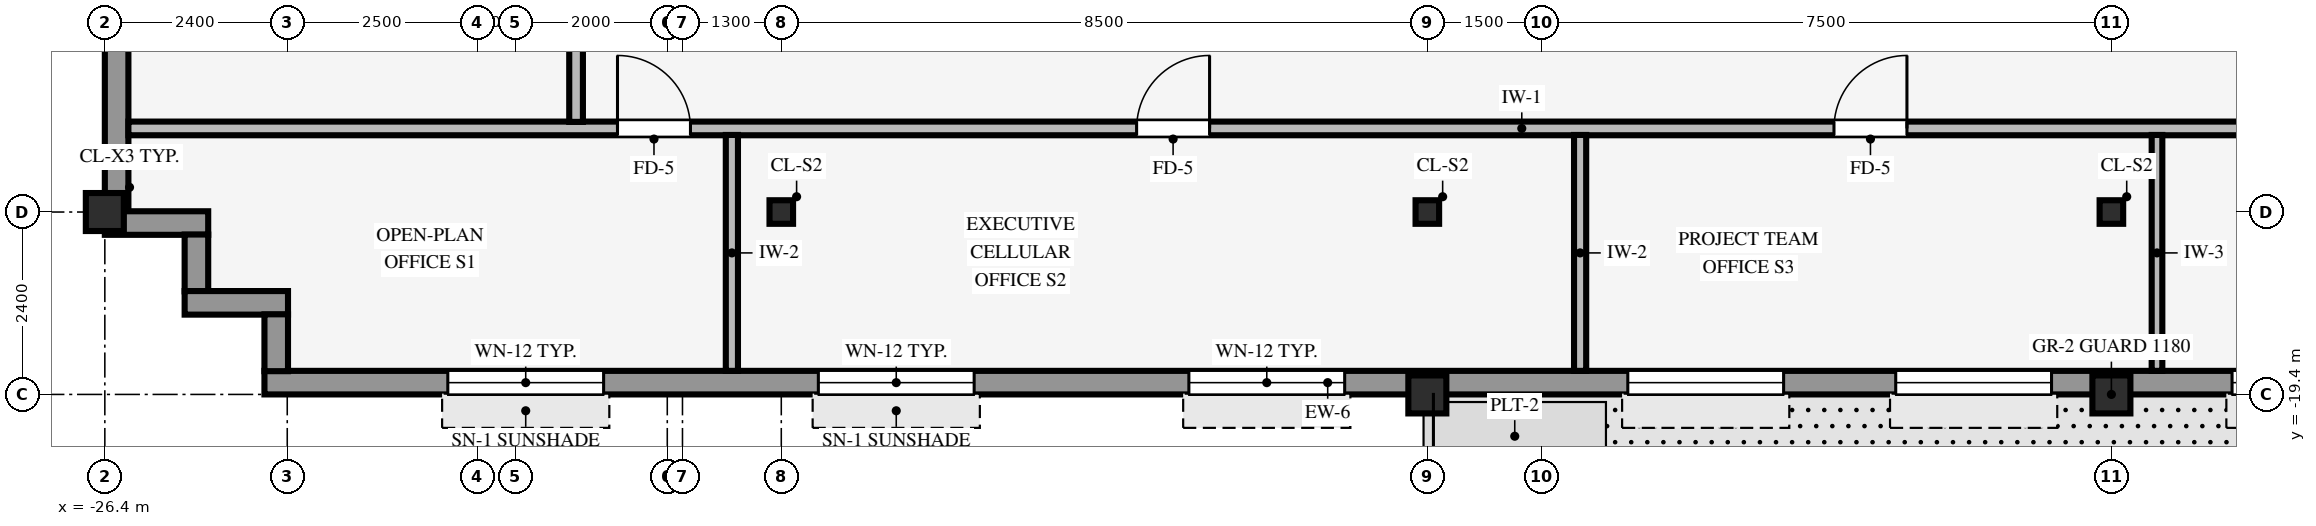
"""IFC4 building model, lengths in metres.
Left out: names, types, materials, properties, quantities, classifications, styles, units other than length and angle.
Written with IfcOpenShell. Run it as: python <this file> out.ifc"""

import sys

from ifc_helpers import new_model, si_unit, direction, frame, frame_2d, origin, origin_2d, place, context, subcontext, project, spatial, rectangle, hollow_rectangle, i_section, extrude, source, transform, mapped, element, fill, save


model = new_model("IFC4")
c1 = context("Model", 3, precision=1e-05, world=origin(), true_north=direction((0.0, 1.0)))
c2 = subcontext(c1, "Body", "Model", "MODEL_VIEW")
j1 = project(units=[si_unit("LENGTHUNIT", "METRE"), si_unit("PLANEANGLEUNIT", "RADIAN")], contexts=[c1])
p1 = place(None, origin())
s1 = spatial("IfcSite", under=j1, at=p1, CompositionType="ELEMENT")
p2 = place(p1, origin())
s2 = spatial("IfcBuilding", under=s1, at=p2, CompositionType="ELEMENT")
p3 = place(p2, frame((0.0, 0.0, 209.15)))
s3 = spatial("IfcBuildingStorey", under=s2, at=p3, CompositionType="ELEMENT", Elevation=209.15)
p4 = place(p3, frame((-26.4, -17.0, 0.0), z_axis=(0.0, 0.0, 1.0), x_axis=(1.0, 0.0, 0.0)))
e1 = element("IfcColumn", 1, at=p4, inside=s3, PredefinedType="COLUMN", context=c2, shape_type="SweptSolid", body=[
    extrude(hollow_rectangle(XDim=0.5, YDim=0.5, WallThickness=0.032, InnerFilletRadius=0.032, OuterFilletRadius=0.064, at=origin_2d()), origin(), (0.0, 0.0, 1.0), 3.37),
])
for number, where, z_axis, x_axis in (
    (2, (-9.0, -19.4, -0.4), (0.0, 0.0, 1.0), (1.0, 0.0, 0.0)),
    (3, (0.0, -19.4, -0.4), (0.0, 0.0, 1.0), (1.0, 0.0, 0.0)),
):
    element("IfcColumn", number, at=place(p3, frame(where, z_axis=z_axis, x_axis=x_axis)), inside=s3, PredefinedType="COLUMN", context=c2, shape_type="SweptSolid", body=[
        extrude(hollow_rectangle(XDim=0.5, YDim=0.5, WallThickness=0.032, InnerFilletRadius=0.032, OuterFilletRadius=0.064, at=origin_2d()), origin(), (0.0, 0.0, 1.0), 3.77),
    ])
for number, where, z_axis, x_axis in (
    (4, (0.0, -17.0, 0.0), (0.0, 0.0, 1.0), (1.0, 0.0, 0.0)),
    (5, (-17.5, -17.0, 0.0), (0.0, 0.0, 1.0), (1.0, 0.0, 0.0)),
    (6, (-9.0, -17.0, 0.0), (0.0, 0.0, 1.0), (1.0, 0.0, 0.0)),
):
    element("IfcColumn", number, at=place(p3, frame(where, z_axis=z_axis, x_axis=x_axis)), inside=s3, PredefinedType="COLUMN", context=c2, shape_type="SweptSolid", body=[
        extrude(i_section(OverallWidth=0.31, OverallDepth=0.31, WebThickness=0.015, FlangeThickness=0.015, FilletRadius=0.015, at=origin_2d()), origin(), (0.0, 0.0, 1.0), 3.37),
    ])
p5 = place(p3, frame((-24.3, -19.245, 0.0), z_axis=(0.0, 0.0, 1.0), x_axis=(1.0, 0.0, 0.0)))
e7 = element("IfcWall", 7, at=p5, inside=s3, PredefinedType="STANDARD", context=c2, shape_type="SweptSolid", body=[
    extrude(rectangle(XDim=41.0, YDim=0.31, at=frame_2d((20.5, 0.0))), origin(), (0.0, 0.0, 1.0), 2.705),
])
p6 = place(p5, frame((29.45, 0.0, 0.0), z_axis=(0.0, 0.0, 1.0), x_axis=(-1.0, 0.0, 0.0)))
e8 = element("IfcOpeningElement", 8, at=p6, cuts=e7, PredefinedType="OPENING", context=c2, shape_type="SweptSolid", body=[
    extrude(rectangle(XDim=1.05, YDim=2.1, at=frame_2d((0.525, 1.05))), frame((0.0, 0.165, 0.0), z_axis=(0.0, -1.0, 0.0), x_axis=(1.0, 0.0, 0.0)), (0.0, 0.0, 1.0), 0.33),
])
p7 = place(p5, frame((2.413, 0.0, 0.8)))
e9 = element("IfcOpeningElement", 9, at=p7, cuts=e7, PredefinedType="OPENING", context=c2, shape_type="SweptSolid", body=[
    extrude(rectangle(XDim=2.05, YDim=1.52, at=frame_2d((1.025, 0.76))), frame((0.0, 0.165, 0.0), z_axis=(0.0, -1.0, 0.0), x_axis=(1.0, 0.0, 0.0)), (0.0, 0.0, 1.0), 0.33),
])
p8 = place(p5, frame((7.288, 0.0, 0.8)))
e10 = element("IfcOpeningElement", 10, at=p8, cuts=e7, PredefinedType="OPENING", context=c2, shape_type="SweptSolid", body=[
    extrude(rectangle(XDim=2.05, YDim=1.52, at=frame_2d((1.025, 0.76))), frame((0.0, 0.165, 0.0), z_axis=(0.0, -1.0, 0.0), x_axis=(1.0, 0.0, 0.0)), (0.0, 0.0, 1.0), 0.33),
])
p9 = place(p5, frame((12.163, 0.0, 0.8)))
e11 = element("IfcOpeningElement", 11, at=p9, cuts=e7, PredefinedType="OPENING", context=c2, shape_type="SweptSolid", body=[
    extrude(rectangle(XDim=2.05, YDim=1.52, at=frame_2d((1.025, 0.76))), frame((0.0, 0.165, 0.0), z_axis=(0.0, -1.0, 0.0), x_axis=(1.0, 0.0, 0.0)), (0.0, 0.0, 1.0), 0.33),
])
p10 = place(p5, frame((17.938, 0.0, 0.8)))
e12 = element("IfcOpeningElement", 12, at=p10, cuts=e7, PredefinedType="OPENING", context=c2, shape_type="SweptSolid", body=[
    extrude(rectangle(XDim=2.05, YDim=1.52, at=frame_2d((1.025, 0.76))), frame((0.0, 0.165, 0.0), z_axis=(0.0, -1.0, 0.0), x_axis=(1.0, 0.0, 0.0)), (0.0, 0.0, 1.0), 0.33),
])
p11 = place(p5, frame((21.462, 0.0, 0.8)))
e13 = element("IfcOpeningElement", 13, at=p11, cuts=e7, PredefinedType="OPENING", context=c2, shape_type="SweptSolid", body=[
    extrude(rectangle(XDim=2.05, YDim=1.52, at=frame_2d((1.025, 0.76))), frame((0.0, 0.165, 0.0), z_axis=(0.0, -1.0, 0.0), x_axis=(1.0, 0.0, 0.0)), (0.0, 0.0, 1.0), 0.33),
])
p12 = place(p5, frame((25.887, 0.0, 0.8)))
e14 = element("IfcOpeningElement", 14, at=p12, cuts=e7, PredefinedType="OPENING", context=c2, shape_type="SweptSolid", body=[
    extrude(rectangle(XDim=2.05, YDim=1.52, at=frame_2d((1.025, 0.76))), frame((0.0, 0.165, 0.0), z_axis=(0.0, -1.0, 0.0), x_axis=(1.0, 0.0, 0.0)), (0.0, 0.0, 1.0), 0.33),
])
p13 = place(p5, frame((30.312, 0.0, 0.8)))
e15 = element("IfcOpeningElement", 15, at=p13, cuts=e7, PredefinedType="OPENING", context=c2, shape_type="SweptSolid", body=[
    extrude(rectangle(XDim=2.05, YDim=1.52, at=frame_2d((1.025, 0.76))), frame((0.0, 0.165, 0.0), z_axis=(0.0, -1.0, 0.0), x_axis=(1.0, 0.0, 0.0)), (0.0, 0.0, 1.0), 0.33),
])
p14 = place(p5, frame((36.538, 0.0, 0.8)))
e16 = element("IfcOpeningElement", 16, at=p14, cuts=e7, PredefinedType="OPENING", context=c2, shape_type="SweptSolid", body=[
    extrude(rectangle(XDim=2.05, YDim=1.52, at=frame_2d((1.025, 0.76))), frame((0.0, 0.165, 0.0), z_axis=(0.0, -1.0, 0.0), x_axis=(1.0, 0.0, 0.0)), (0.0, 0.0, 1.0), 0.33),
])
p15 = place(p3, frame((-26.245, -16.994, 0.0), z_axis=(0.0, 0.0, 1.0), x_axis=(0.0, 1.0, 0.0)))
e17 = element("IfcWall", 17, at=p15, inside=s3, PredefinedType="STANDARD", context=c2, shape_type="SweptSolid", body=[
    extrude(rectangle(XDim=33.988, YDim=0.31, at=frame_2d((16.994, 0.0))), origin(), (0.0, 0.0, 1.0), 2.705),
])
p16 = place(p15, frame((21.194, 0.0, 0.0)))
e18 = element("IfcOpeningElement", 18, at=p16, cuts=e17, PredefinedType="OPENING", context=c2, shape_type="SweptSolid", body=[
    extrude(rectangle(XDim=1.05, YDim=2.1, at=frame_2d((0.525, 1.05))), frame((0.0, 0.165, 0.0), z_axis=(0.0, -1.0, 0.0), x_axis=(1.0, 0.0, 0.0)), (0.0, 0.0, 1.0), 0.33),
])
p17 = place(p15, frame((2.66, 0.0, 0.8)))
e19 = element("IfcOpeningElement", 19, at=p17, cuts=e17, PredefinedType="OPENING", context=c2, shape_type="SweptSolid", body=[
    extrude(rectangle(XDim=1.25, YDim=1.52, at=frame_2d((0.625, 0.76))), frame((0.0, 0.165, 0.0), z_axis=(0.0, -1.0, 0.0), x_axis=(1.0, 0.0, 0.0)), (0.0, 0.0, 1.0), 0.33),
])
p18 = place(p15, frame((8.13, 0.0, 0.8)))
e20 = element("IfcOpeningElement", 20, at=p18, cuts=e17, PredefinedType="OPENING", context=c2, shape_type="SweptSolid", body=[
    extrude(rectangle(XDim=1.25, YDim=1.52, at=frame_2d((0.625, 0.76))), frame((0.0, 0.165, 0.0), z_axis=(0.0, -1.0, 0.0), x_axis=(1.0, 0.0, 0.0)), (0.0, 0.0, 1.0), 0.33),
])
p19 = place(p15, frame((11.799, 0.0, 0.8)))
e21 = element("IfcOpeningElement", 21, at=p19, cuts=e17, PredefinedType="OPENING", context=c2, shape_type="SweptSolid", body=[
    extrude(rectangle(XDim=1.25, YDim=1.52, at=frame_2d((0.625, 0.76))), frame((0.0, 0.165, 0.0), z_axis=(0.0, -1.0, 0.0), x_axis=(1.0, 0.0, 0.0)), (0.0, 0.0, 1.0), 0.33),
])
p20 = place(p15, frame((17.719, 0.0, 0.8)))
e22 = element("IfcOpeningElement", 22, at=p20, cuts=e17, PredefinedType="OPENING", context=c2, shape_type="SweptSolid", body=[
    extrude(rectangle(XDim=1.25, YDim=1.52, at=frame_2d((0.625, 0.76))), frame((0.0, 0.165, 0.0), z_axis=(0.0, -1.0, 0.0), x_axis=(1.0, 0.0, 0.0)), (0.0, 0.0, 1.0), 0.33),
])
p21 = place(p15, frame((19.589, 0.0, 0.8)))
e23 = element("IfcOpeningElement", 23, at=p21, cuts=e17, PredefinedType="OPENING", context=c2, shape_type="SweptSolid", body=[
    extrude(rectangle(XDim=1.25, YDim=1.52, at=frame_2d((0.625, 0.76))), frame((0.0, 0.165, 0.0), z_axis=(0.0, -1.0, 0.0), x_axis=(1.0, 0.0, 0.0)), (0.0, 0.0, 1.0), 0.33),
])
p22 = place(p15, frame((24.608, 0.0, 0.8)))
e24 = element("IfcOpeningElement", 24, at=p22, cuts=e17, PredefinedType="OPENING", context=c2, shape_type="SweptSolid", body=[
    extrude(rectangle(XDim=1.25, YDim=1.52, at=frame_2d((0.625, 0.76))), frame((0.0, 0.165, 0.0), z_axis=(0.0, -1.0, 0.0), x_axis=(1.0, 0.0, 0.0)), (0.0, 0.0, 1.0), 0.33),
])
p23 = place(p15, frame((30.078, 0.0, 0.8)))
e25 = element("IfcOpeningElement", 25, at=p23, cuts=e17, PredefinedType="OPENING", context=c2, shape_type="SweptSolid", body=[
    extrude(rectangle(XDim=1.25, YDim=1.52, at=frame_2d((0.625, 0.76))), frame((0.0, 0.165, 0.0), z_axis=(0.0, -1.0, 0.0), x_axis=(1.0, 0.0, 0.0)), (0.0, 0.0, 1.0), 0.33),
])
p24 = place(p3, frame((-26.4, -17.145, 0.0), z_axis=(0.0, 0.0, 1.0), x_axis=(1.0, 0.0, 0.0)))
e26 = element("IfcWall", 26, at=p24, inside=s3, PredefinedType="STANDARD", context=c2, shape_type="SweptSolid", body=[
    extrude(rectangle(XDim=1.36, YDim=0.31, at=frame_2d((0.68, 0.0))), origin(), (0.0, 0.0, 1.0), 2.816),
])
p25 = place(p3, frame((-25.195, -18.044, 0.0), z_axis=(0.0, 0.0, 1.0), x_axis=(0.0, 1.0, 0.0)))
e27 = element("IfcWall", 27, at=p25, inside=s3, PredefinedType="STANDARD", context=c2, shape_type="SweptSolid", body=[
    extrude(rectangle(XDim=0.748, YDim=0.31, at=frame_2d((0.374, 0.0))), origin(), (0.0, 0.0, 1.0), 2.816),
])
p26 = place(p3, frame((-25.35, -18.195, 0.0), z_axis=(0.0, 0.0, 1.0), x_axis=(1.0, 0.0, 0.0)))
e28 = element("IfcWall", 28, at=p26, inside=s3, PredefinedType="STANDARD", context=c2, shape_type="SweptSolid", body=[
    extrude(rectangle(XDim=1.36, YDim=0.31, at=frame_2d((0.68, 0.0))), origin(), (0.0, 0.0, 1.0), 2.816),
])
p27 = place(p3, frame((-24.145, -19.094, 0.0), z_axis=(0.0, 0.0, 1.0), x_axis=(0.0, 1.0, 0.0)))
e29 = element("IfcWall", 29, at=p27, inside=s3, PredefinedType="STANDARD", context=c2, shape_type="SweptSolid", body=[
    extrude(rectangle(XDim=0.748, YDim=0.31, at=frame_2d((0.374, 0.0))), origin(), (0.0, 0.0, 1.0), 2.816),
])
p28 = place(p3, frame((-26.09, -15.9, 0.0), z_axis=(0.0, 0.0, 1.0), x_axis=(1.0, 0.0, 0.0)))
e30 = element("IfcWall", 30, at=p28, inside=s3, PredefinedType="PARTITIONING", context=c2, shape_type="SweptSolid", body=[
    extrude(rectangle(XDim=35.09, YDim=0.18, at=frame_2d((17.545, 0.0))), origin(), (0.0, 0.0, 1.0), 3.36),
])
p29 = place(p28, frame((13.265, 0.0, 0.0)))
e31 = element("IfcOpeningElement", 31, at=p29, cuts=e30, PredefinedType="OPENING", context=c2, shape_type="SweptSolid", body=[
    extrude(rectangle(XDim=0.96, YDim=2.1, at=frame_2d((0.48, 1.05))), frame((0.0, 0.1, 0.0), z_axis=(0.0, -1.0, 0.0), x_axis=(1.0, 0.0, 0.0)), (0.0, 0.0, 1.0), 0.2),
])
p30 = place(p28, frame((22.44, 0.0, 0.0)))
e32 = element("IfcOpeningElement", 32, at=p30, cuts=e30, PredefinedType="OPENING", context=c2, shape_type="SweptSolid", body=[
    extrude(rectangle(XDim=0.96, YDim=2.1, at=frame_2d((0.48, 1.05))), frame((0.0, 0.1, 0.0), z_axis=(0.0, -1.0, 0.0), x_axis=(1.0, 0.0, 0.0)), (0.0, 0.0, 1.0), 0.2),
])
p31 = place(p28, frame((29.235, 0.0, 0.0)))
e33 = element("IfcOpeningElement", 33, at=p31, cuts=e30, PredefinedType="OPENING", context=c2, shape_type="SweptSolid", body=[
    extrude(rectangle(XDim=0.96, YDim=2.1, at=frame_2d((0.48, 1.05))), frame((0.0, 0.1, 0.0), z_axis=(0.0, -1.0, 0.0), x_axis=(1.0, 0.0, 0.0)), (0.0, 0.0, 1.0), 0.2),
])
p32 = place(p28, frame((6.435, 0.0, 0.0)))
e34 = element("IfcOpeningElement", 34, at=p32, cuts=e30, PredefinedType="OPENING", context=c2, shape_type="SweptSolid", body=[
    extrude(rectangle(XDim=0.96, YDim=2.1, at=frame_2d((0.48, 1.05))), frame((0.0, 0.1, 0.0), z_axis=(0.0, -1.0, 0.0), x_axis=(1.0, 0.0, 0.0)), (0.0, 0.0, 1.0), 0.2),
])
p33 = place(p3, frame((-20.2, -15.814, 0.0), z_axis=(0.0, 0.0, 1.0), x_axis=(0.0, 1.0, 0.0)))
e35 = element("IfcWall", 35, at=p33, inside=s3, PredefinedType="PARTITIONING", context=c2, shape_type="SweptSolid", body=[
    extrude(rectangle(XDim=31.628, YDim=0.18, at=frame_2d((15.814, 0.0))), origin(), (0.0, 0.0, 1.0), 3.36),
])
p34 = place(p33, frame((15.334, 0.0, 0.0)))
e36 = element("IfcOpeningElement", 36, at=p34, cuts=e35, PredefinedType="OPENING", context=c2, shape_type="SweptSolid", body=[
    extrude(rectangle(XDim=0.96, YDim=2.1, at=frame_2d((0.48, 1.05))), frame((0.0, 0.1, 0.0), z_axis=(0.0, -1.0, 0.0), x_axis=(1.0, 0.0, 0.0)), (0.0, 0.0, 1.0), 0.2),
])
for number, where, z_axis, x_axis in (
    (37, (-18.15, -19.09, 0.0), (0.0, 0.0, 1.0), (0.0, 1.0, 0.0)),
    (38, (-6.99, -19.09, 0.0), (0.0, 0.0, 1.0), (0.0, 1.0, 0.0)),
):
    element("IfcWall", number, at=place(p3, frame(where, z_axis=z_axis, x_axis=x_axis)), inside=s3, PredefinedType="PARTITIONING", context=c2, shape_type="SweptSolid", body=[
        extrude(rectangle(XDim=3.104, YDim=0.16, at=frame_2d((1.552, 0.0))), origin(), (0.0, 0.0, 1.0), 3.36),
    ])
p35 = place(p3, frame((0.6, -19.09, 0.0), z_axis=(0.0, 0.0, 1.0), x_axis=(0.0, 1.0, 0.0)))
e39 = element("IfcWall", 39, at=p35, inside=s3, PredefinedType="PARTITIONING", context=c2, shape_type="SweptSolid", body=[
    extrude(rectangle(XDim=3.104, YDim=0.14, at=frame_2d((1.552, 0.0))), origin(), (0.0, 0.0, 1.0), 3.36),
])
m1 = source(origin(), c2, "Body", "SweptSolid", [
    extrude(rectangle(XDim=2.05, YDim=1.52, at=frame_2d((1.025, 0.76))), frame((0.0, 0.03, 0.0), z_axis=(0.0, -1.0, 0.0), x_axis=(1.0, 0.0, 0.0)), (0.0, 0.0, 1.0), 0.06),
])
p36 = place(p7, origin())
e40 = element("IfcWindow", 40, at=p36, inside=s3, PartitioningType="SINGLE_PANEL", PredefinedType="WINDOW", context=c2, shape_type="MappedRepresentation", body=[
    mapped(m1, transform((0.0, 0.0, 0.0), scale=1.0)),
])
fill(e9, e40)
p37 = place(p8, origin())
e41 = element("IfcWindow", 41, at=p37, inside=s3, PartitioningType="SINGLE_PANEL", PredefinedType="WINDOW", context=c2, shape_type="MappedRepresentation", body=[
    mapped(m1, transform((0.0, 0.0, 0.0), scale=1.0)),
])
fill(e10, e41)
p38 = place(p9, origin())
e42 = element("IfcWindow", 42, at=p38, inside=s3, PartitioningType="SINGLE_PANEL", PredefinedType="WINDOW", context=c2, shape_type="MappedRepresentation", body=[
    mapped(m1, transform((0.0, 0.0, 0.0), scale=1.0)),
])
fill(e11, e42)
p39 = place(p10, origin())
e43 = element("IfcWindow", 43, at=p39, inside=s3, PartitioningType="SINGLE_PANEL", PredefinedType="WINDOW", context=c2, shape_type="MappedRepresentation", body=[
    mapped(m1, transform((0.0, 0.0, 0.0), scale=1.0)),
])
fill(e12, e43)
p40 = place(p11, origin())
e44 = element("IfcWindow", 44, at=p40, inside=s3, PartitioningType="SINGLE_PANEL", PredefinedType="WINDOW", context=c2, shape_type="MappedRepresentation", body=[
    mapped(m1, transform((0.0, 0.0, 0.0), scale=1.0)),
])
fill(e13, e44)
p41 = place(p12, origin())
e45 = element("IfcWindow", 45, at=p41, inside=s3, PartitioningType="SINGLE_PANEL", PredefinedType="WINDOW", context=c2, shape_type="MappedRepresentation", body=[
    mapped(m1, transform((0.0, 0.0, 0.0), scale=1.0)),
])
fill(e14, e45)
m2 = source(origin(), c2, "Body", "SweptSolid", [
    extrude(rectangle(XDim=0.96, YDim=2.1, at=frame_2d((0.48, 1.05))), frame((0.0, 0.025, 0.0), z_axis=(0.0, -1.0, 0.0), x_axis=(1.0, 0.0, 0.0)), (0.0, 0.0, 1.0), 0.05),
])
p42 = place(p29, origin())
e46 = element("IfcDoor", 46, at=p42, inside=s3, OperationType="SINGLE_SWING_RIGHT", PredefinedType="DOOR", context=c2, shape_type="MappedRepresentation", body=[
    mapped(m2, transform((0.0, 0.0, 0.0), scale=1.0)),
])
fill(e31, e46)
p43 = place(p30, origin())
e47 = element("IfcDoor", 47, at=p43, inside=s3, OperationType="SINGLE_SWING_RIGHT", PredefinedType="DOOR", context=c2, shape_type="MappedRepresentation", body=[
    mapped(m2, transform((0.0, 0.0, 0.0), scale=1.0)),
])
fill(e32, e47)
p44 = place(p32, origin())
e48 = element("IfcDoor", 48, at=p44, inside=s3, OperationType="SINGLE_SWING_LEFT", PredefinedType="DOOR", context=c2, shape_type="MappedRepresentation", body=[
    mapped(m2, transform((0.0, 0.0, 0.0), scale=1.0)),
])
fill(e34, e48)
save(model, sys.argv[1])
